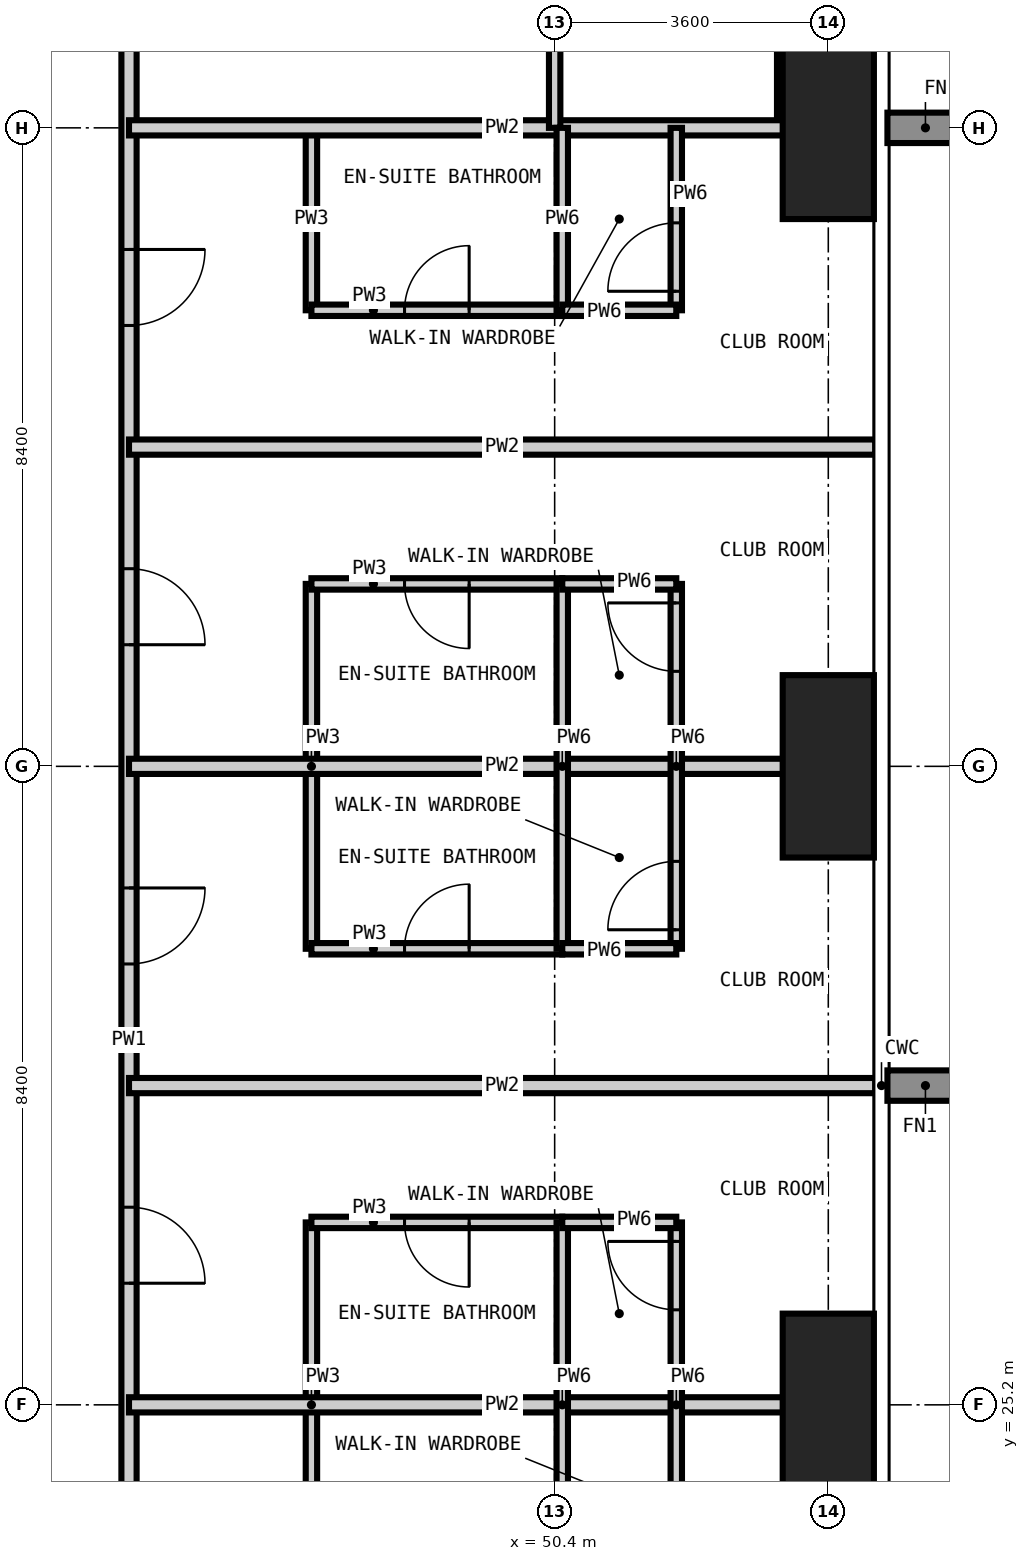
"""IFC4 building model, lengths in metres.
Left out: names, types, materials, properties, quantities, classifications, styles, units other than length and angle.
Written with IfcOpenShell. Run it as: python <this file> out.ifc"""

import sys

from ifc_helpers import new_model, si_unit, direction, frame, frame_2d, origin, origin_2d, place, context, subcontext, project, spatial, rectangle, extrude, element, fill, save


model = new_model("IFC4")
c1 = context("Model", 3, precision=1e-05, world=origin(), true_north=direction((0.0, 1.0)))
c2 = subcontext(c1, "Body", "Model", "MODEL_VIEW")
j1 = project(units=[si_unit("LENGTHUNIT", "METRE"), si_unit("PLANEANGLEUNIT", "RADIAN")], contexts=[c1])
p1 = place(None, origin())
s1 = spatial("IfcSite", under=j1, at=p1, CompositionType="ELEMENT")
p2 = place(p1, origin())
s2 = spatial("IfcBuilding", under=s1, at=p2, CompositionType="ELEMENT")
p3 = place(p2, frame((0.0, 0.0, 180.6)))
s3 = spatial("IfcBuildingStorey", under=s2, at=p3, CompositionType="ELEMENT", Elevation=180.6)
for number, where, z_axis, x_axis in (
    (1, (54.0, 25.2, -0.35), (0.0, 0.0, 1.0), (1.0, 0.0, 0.0)),
    (2, (54.0, 33.6, -0.35), (0.0, 0.0, 1.0), (1.0, 0.0, 0.0)),
    (3, (54.0, 42.0, -0.35), (0.0, 0.0, 1.0), (1.0, 0.0, 0.0)),
):
    element("IfcColumn", number, at=place(p3, frame(where, z_axis=z_axis, x_axis=x_axis)), inside=s3, PredefinedType="COLUMN", context=c2, shape_type="SweptSolid", body=[
        extrude(rectangle(XDim=1.2, YDim=2.4, at=origin_2d()), origin(), (0.0, 0.0, 1.0), 3.6),
    ])
for number, where, z_axis, x_axis in (
    (4, (47.2, 22.8, 0.0), (0.0, 0.0, 1.0), (0.0, 1.0, 0.0)),
    (5, (47.2, 31.2, 0.0), (0.0, 0.0, 1.0), (0.0, 1.0, 0.0)),
):
    element("IfcWall", number, at=place(p3, frame(where, z_axis=z_axis, x_axis=x_axis)), inside=s3, PredefinedType="PARTITIONING", context=c2, shape_type="SweptSolid", body=[
        extrude(rectangle(XDim=4.8, YDim=0.15, at=frame_2d((2.4, 0.0))), origin(), (0.0, 0.0, 1.0), 3.25),
    ])
p4 = place(p3, frame((47.2, 39.6, 0.0), z_axis=(0.0, 0.0, 1.0), x_axis=(0.0, 1.0, 0.0)))
e6 = element("IfcWall", 6, at=p4, inside=s3, PredefinedType="PARTITIONING", context=c2, shape_type="SweptSolid", body=[
    extrude(rectangle(XDim=2.4, YDim=0.15, at=frame_2d((1.2, 0.0))), origin(), (0.0, 0.0, 1.0), 3.25),
])
p5 = place(p3, frame((53.4, 42.0, 0.0), z_axis=(0.0, 0.0, 1.0), x_axis=(0.0, 1.0, 0.0)))
e7 = element("IfcWall", 7, at=p5, inside=s3, PredefinedType="PARTITIONING", context=c2, shape_type="SweptSolid", body=[
    extrude(rectangle(XDim=3.6, YDim=0.15, at=frame_2d((1.8, 0.0))), origin(), (0.0, 0.0, 1.0), 3.25),
])
p6 = place(p5, frame((1.375, 0.0, 0.0)))
e8 = element("IfcOpeningElement", 8, at=p6, cuts=e7, PredefinedType="OPENING", context=c2, shape_type="SweptSolid", body=[
    extrude(rectangle(XDim=0.85, YDim=2.1, at=frame_2d((0.425, 1.05))), frame((0.0, 0.085, 0.0), z_axis=(0.0, -1.0, 0.0), x_axis=(1.0, 0.0, 0.0)), (0.0, 0.0, 1.0), 0.17),
])
p7 = place(p3, frame((47.2, 27.6, 0.0), z_axis=(0.0, 0.0, 1.0), x_axis=(1.0, 0.0, 0.0)))
e9 = element("IfcWall", 9, at=p7, inside=s3, PredefinedType="PARTITIONING", context=c2, shape_type="SweptSolid", body=[
    extrude(rectangle(XDim=3.3, YDim=0.15, at=frame_2d((1.65, 0.0))), origin(), (0.0, 0.0, 1.0), 3.25),
])
p8 = place(p7, frame((1.225, 0.0, 0.0)))
e10 = element("IfcOpeningElement", 10, at=p8, cuts=e9, PredefinedType="OPENING", context=c2, shape_type="SweptSolid", body=[
    extrude(rectangle(XDim=0.85, YDim=2.1, at=frame_2d((0.425, 1.05))), frame((0.0, 0.085, 0.0), z_axis=(0.0, -1.0, 0.0), x_axis=(1.0, 0.0, 0.0)), (0.0, 0.0, 1.0), 0.17),
])
p9 = place(p3, frame((47.2, 31.2, 0.0), z_axis=(0.0, 0.0, 1.0), x_axis=(1.0, 0.0, 0.0)))
e11 = element("IfcWall", 11, at=p9, inside=s3, PredefinedType="PARTITIONING", context=c2, shape_type="SweptSolid", body=[
    extrude(rectangle(XDim=3.3, YDim=0.15, at=frame_2d((1.65, 0.0))), origin(), (0.0, 0.0, 1.0), 3.25),
])
p10 = place(p9, frame((1.225, 0.0, 0.0)))
e12 = element("IfcOpeningElement", 12, at=p10, cuts=e11, PredefinedType="OPENING", context=c2, shape_type="SweptSolid", body=[
    extrude(rectangle(XDim=0.85, YDim=2.1, at=frame_2d((0.425, 1.05))), frame((0.0, 0.085, 0.0), z_axis=(0.0, -1.0, 0.0), x_axis=(1.0, 0.0, 0.0)), (0.0, 0.0, 1.0), 0.17),
])
p11 = place(p3, frame((47.2, 36.0, 0.0), z_axis=(0.0, 0.0, 1.0), x_axis=(1.0, 0.0, 0.0)))
e13 = element("IfcWall", 13, at=p11, inside=s3, PredefinedType="PARTITIONING", context=c2, shape_type="SweptSolid", body=[
    extrude(rectangle(XDim=3.3, YDim=0.15, at=frame_2d((1.65, 0.0))), origin(), (0.0, 0.0, 1.0), 3.25),
])
p12 = place(p11, frame((1.225, 0.0, 0.0)))
e14 = element("IfcOpeningElement", 14, at=p12, cuts=e13, PredefinedType="OPENING", context=c2, shape_type="SweptSolid", body=[
    extrude(rectangle(XDim=0.85, YDim=2.1, at=frame_2d((0.425, 1.05))), frame((0.0, 0.085, 0.0), z_axis=(0.0, -1.0, 0.0), x_axis=(1.0, 0.0, 0.0)), (0.0, 0.0, 1.0), 0.17),
])
p13 = place(p3, frame((47.2, 39.6, 0.0), z_axis=(0.0, 0.0, 1.0), x_axis=(1.0, 0.0, 0.0)))
e15 = element("IfcWall", 15, at=p13, inside=s3, PredefinedType="PARTITIONING", context=c2, shape_type="SweptSolid", body=[
    extrude(rectangle(XDim=3.3, YDim=0.15, at=frame_2d((1.65, 0.0))), origin(), (0.0, 0.0, 1.0), 3.25),
])
p14 = place(p13, frame((1.225, 0.0, 0.0)))
e16 = element("IfcOpeningElement", 16, at=p14, cuts=e15, PredefinedType="OPENING", context=c2, shape_type="SweptSolid", body=[
    extrude(rectangle(XDim=0.85, YDim=2.1, at=frame_2d((0.425, 1.05))), frame((0.0, 0.085, 0.0), z_axis=(0.0, -1.0, 0.0), x_axis=(1.0, 0.0, 0.0)), (0.0, 0.0, 1.0), 0.17),
])
p15 = place(p3, frame((44.8, 45.4, 0.0), z_axis=(0.0, 0.0, 1.0), x_axis=(0.0, -1.0, 0.0)))
e17 = element("IfcWall", 17, at=p15, inside=s3, PredefinedType="PARTITIONING", context=c2, shape_type="SweptSolid", body=[
    extrude(rectangle(XDim=30.8, YDim=0.2, at=frame_2d((15.4, 0.0))), origin(), (0.0, 0.0, 1.0), 3.25),
])
p16 = place(p15, frame((26.0, 0.0, 0.0)))
e18 = element("IfcOpeningElement", 18, at=p16, cuts=e17, PredefinedType="OPENING", context=c2, shape_type="SweptSolid", body=[
    extrude(rectangle(XDim=1.0, YDim=2.2, at=frame_2d((0.5, 1.1))), frame((0.0, 0.11, 0.0), z_axis=(0.0, -1.0, 0.0), x_axis=(1.0, 0.0, 0.0)), (0.0, 0.0, 1.0), 0.22),
])
p17 = place(p15, frame((21.8, 0.0, 0.0)))
e19 = element("IfcOpeningElement", 19, at=p17, cuts=e17, PredefinedType="OPENING", context=c2, shape_type="SweptSolid", body=[
    extrude(rectangle(XDim=1.0, YDim=2.2, at=frame_2d((0.5, 1.1))), frame((0.0, 0.11, 0.0), z_axis=(0.0, -1.0, 0.0), x_axis=(1.0, 0.0, 0.0)), (0.0, 0.0, 1.0), 0.22),
])
p18 = place(p15, frame((17.6, 0.0, 0.0)))
e20 = element("IfcOpeningElement", 20, at=p18, cuts=e17, PredefinedType="OPENING", context=c2, shape_type="SweptSolid", body=[
    extrude(rectangle(XDim=1.0, YDim=2.2, at=frame_2d((0.5, 1.1))), frame((0.0, 0.11, 0.0), z_axis=(0.0, -1.0, 0.0), x_axis=(1.0, 0.0, 0.0)), (0.0, 0.0, 1.0), 0.22),
])
p19 = place(p15, frame((13.4, 0.0, 0.0)))
e21 = element("IfcOpeningElement", 21, at=p19, cuts=e17, PredefinedType="OPENING", context=c2, shape_type="SweptSolid", body=[
    extrude(rectangle(XDim=1.0, YDim=2.2, at=frame_2d((0.5, 1.1))), frame((0.0, 0.11, 0.0), z_axis=(0.0, -1.0, 0.0), x_axis=(1.0, 0.0, 0.0)), (0.0, 0.0, 1.0), 0.22),
])
p20 = place(p15, frame((9.2, 0.0, 0.0)))
e22 = element("IfcOpeningElement", 22, at=p20, cuts=e17, PredefinedType="OPENING", context=c2, shape_type="SweptSolid", body=[
    extrude(rectangle(XDim=1.0, YDim=2.2, at=frame_2d((0.5, 1.1))), frame((0.0, 0.11, 0.0), z_axis=(0.0, -1.0, 0.0), x_axis=(1.0, 0.0, 0.0)), (0.0, 0.0, 1.0), 0.22),
])
p21 = place(p15, frame((5.0, 0.0, 0.0)))
e23 = element("IfcOpeningElement", 23, at=p21, cuts=e17, PredefinedType="OPENING", context=c2, shape_type="SweptSolid", body=[
    extrude(rectangle(XDim=1.0, YDim=2.2, at=frame_2d((0.5, 1.1))), frame((0.0, 0.11, 0.0), z_axis=(0.0, -1.0, 0.0), x_axis=(1.0, 0.0, 0.0)), (0.0, 0.0, 1.0), 0.22),
])
p22 = place(p15, frame((29.2, 0.0, 0.0)))
e24 = element("IfcOpeningElement", 24, at=p22, cuts=e17, PredefinedType="OPENING", context=c2, shape_type="SweptSolid", body=[
    extrude(rectangle(XDim=1.0, YDim=2.2, at=frame_2d((0.5, 1.1))), frame((0.0, 0.11, 0.0), z_axis=(0.0, -1.0, 0.0), x_axis=(1.0, 0.0, 0.0)), (0.0, 0.0, 1.0), 0.22),
])
p23 = place(p15, frame((1.2, 0.0, 0.0)))
e25 = element("IfcOpeningElement", 25, at=p23, cuts=e17, PredefinedType="OPENING", context=c2, shape_type="SweptSolid", body=[
    extrude(rectangle(XDim=1.0, YDim=2.2, at=frame_2d((0.5, 1.1))), frame((0.0, 0.11, 0.0), z_axis=(0.0, -1.0, 0.0), x_axis=(1.0, 0.0, 0.0)), (0.0, 0.0, 1.0), 0.22),
])
for number, where, z_axis, x_axis in (
    (26, (44.8, 25.2, 0.0), (0.0, 0.0, 1.0), (1.0, 0.0, 0.0)),
    (27, (44.8, 29.4, 0.0), (0.0, 0.0, 1.0), (1.0, 0.0, 0.0)),
    (28, (44.8, 33.6, 0.0), (0.0, 0.0, 1.0), (1.0, 0.0, 0.0)),
    (29, (44.8, 37.8, 0.0), (0.0, 0.0, 1.0), (1.0, 0.0, 0.0)),
    (30, (44.8, 42.0, 0.0), (0.0, 0.0, 1.0), (1.0, 0.0, 0.0)),
):
    element("IfcWall", number, at=place(p3, frame(where, z_axis=z_axis, x_axis=x_axis)), inside=s3, PredefinedType="PARTITIONING", context=c2, shape_type="SweptSolid", body=[
        extrude(rectangle(XDim=9.818, YDim=0.2, at=frame_2d((4.909, 0.0))), origin(), (0.0, 0.0, 1.0), 3.25),
    ])
p24 = place(p3, frame((50.4, 42.0, 0.0), z_axis=(0.0, 0.0, 1.0), x_axis=(0.0, 1.0, 0.0)))
e31 = element("IfcWall", 31, at=p24, inside=s3, PredefinedType="PARTITIONING", context=c2, shape_type="SweptSolid", body=[
    extrude(rectangle(XDim=12.618, YDim=0.15, at=frame_2d((6.309, 0.0))), origin(), (0.0, 0.0, 1.0), 3.25),
])
p25 = place(p24, frame((8.85, 0.0, 0.0)))
e32 = element("IfcOpeningElement", 32, at=p25, cuts=e31, PredefinedType="OPENING", context=c2, shape_type="SweptSolid", body=[
    extrude(rectangle(XDim=0.9, YDim=2.1, at=frame_2d((0.45, 1.05))), frame((0.0, 0.085, 0.0), z_axis=(0.0, -1.0, 0.0), x_axis=(1.0, 0.0, 0.0)), (0.0, 0.0, 1.0), 0.17),
])
for number, where, z_axis, x_axis in (
    (33, (50.5, 22.8, 0.0), (0.0, 0.0, 1.0), (0.0, 1.0, 0.0)),
    (34, (50.5, 31.2, 0.0), (0.0, 0.0, 1.0), (0.0, 1.0, 0.0)),
):
    element("IfcWall", number, at=place(p3, frame(where, z_axis=z_axis, x_axis=x_axis)), inside=s3, PredefinedType="PARTITIONING", context=c2, shape_type="SweptSolid", body=[
        extrude(rectangle(XDim=4.8, YDim=0.15, at=frame_2d((2.4, 0.0))), origin(), (0.0, 0.0, 1.0), 3.25),
    ])
p26 = place(p3, frame((50.5, 39.6, 0.0), z_axis=(0.0, 0.0, 1.0), x_axis=(0.0, 1.0, 0.0)))
e35 = element("IfcWall", 35, at=p26, inside=s3, PredefinedType="PARTITIONING", context=c2, shape_type="SweptSolid", body=[
    extrude(rectangle(XDim=2.4, YDim=0.15, at=frame_2d((1.2, 0.0))), origin(), (0.0, 0.0, 1.0), 3.25),
])
p27 = place(p3, frame((52.0, 22.8, 0.0), z_axis=(0.0, 0.0, 1.0), x_axis=(0.0, 1.0, 0.0)))
e36 = element("IfcWall", 36, at=p27, inside=s3, PredefinedType="PARTITIONING", context=c2, shape_type="SweptSolid", body=[
    extrude(rectangle(XDim=4.8, YDim=0.15, at=frame_2d((2.4, 0.0))), origin(), (0.0, 0.0, 1.0), 3.25),
])
p28 = place(p27, frame((0.25, 0.0, 0.0)))
e37 = element("IfcOpeningElement", 37, at=p28, cuts=e36, PredefinedType="OPENING", context=c2, shape_type="SweptSolid", body=[
    extrude(rectangle(XDim=0.9, YDim=2.1, at=frame_2d((0.45, 1.05))), frame((0.0, 0.085, 0.0), z_axis=(0.0, -1.0, 0.0), x_axis=(1.0, 0.0, 0.0)), (0.0, 0.0, 1.0), 0.17),
])
p29 = place(p27, frame((3.65, 0.0, 0.0)))
e38 = element("IfcOpeningElement", 38, at=p29, cuts=e36, PredefinedType="OPENING", context=c2, shape_type="SweptSolid", body=[
    extrude(rectangle(XDim=0.9, YDim=2.1, at=frame_2d((0.45, 1.05))), frame((0.0, 0.085, 0.0), z_axis=(0.0, -1.0, 0.0), x_axis=(1.0, 0.0, 0.0)), (0.0, 0.0, 1.0), 0.17),
])
p30 = place(p3, frame((52.0, 31.2, 0.0), z_axis=(0.0, 0.0, 1.0), x_axis=(0.0, 1.0, 0.0)))
e39 = element("IfcWall", 39, at=p30, inside=s3, PredefinedType="PARTITIONING", context=c2, shape_type="SweptSolid", body=[
    extrude(rectangle(XDim=4.8, YDim=0.15, at=frame_2d((2.4, 0.0))), origin(), (0.0, 0.0, 1.0), 3.25),
])
p31 = place(p30, frame((0.25, 0.0, 0.0)))
e40 = element("IfcOpeningElement", 40, at=p31, cuts=e39, PredefinedType="OPENING", context=c2, shape_type="SweptSolid", body=[
    extrude(rectangle(XDim=0.9, YDim=2.1, at=frame_2d((0.45, 1.05))), frame((0.0, 0.085, 0.0), z_axis=(0.0, -1.0, 0.0), x_axis=(1.0, 0.0, 0.0)), (0.0, 0.0, 1.0), 0.17),
])
p32 = place(p30, frame((3.65, 0.0, 0.0)))
e41 = element("IfcOpeningElement", 41, at=p32, cuts=e39, PredefinedType="OPENING", context=c2, shape_type="SweptSolid", body=[
    extrude(rectangle(XDim=0.9, YDim=2.1, at=frame_2d((0.45, 1.05))), frame((0.0, 0.085, 0.0), z_axis=(0.0, -1.0, 0.0), x_axis=(1.0, 0.0, 0.0)), (0.0, 0.0, 1.0), 0.17),
])
p33 = place(p3, frame((52.0, 39.6, 0.0), z_axis=(0.0, 0.0, 1.0), x_axis=(0.0, 1.0, 0.0)))
e42 = element("IfcWall", 42, at=p33, inside=s3, PredefinedType="PARTITIONING", context=c2, shape_type="SweptSolid", body=[
    extrude(rectangle(XDim=2.4, YDim=0.15, at=frame_2d((1.2, 0.0))), origin(), (0.0, 0.0, 1.0), 3.25),
])
p34 = place(p33, frame((0.25, 0.0, 0.0)))
e43 = element("IfcOpeningElement", 43, at=p34, cuts=e42, PredefinedType="OPENING", context=c2, shape_type="SweptSolid", body=[
    extrude(rectangle(XDim=0.9, YDim=2.1, at=frame_2d((0.45, 1.05))), frame((0.0, 0.085, 0.0), z_axis=(0.0, -1.0, 0.0), x_axis=(1.0, 0.0, 0.0)), (0.0, 0.0, 1.0), 0.17),
])
for number, where, z_axis, x_axis in (
    (44, (50.5, 27.6, 0.0), (0.0, 0.0, 1.0), (1.0, 0.0, 0.0)),
    (45, (50.5, 31.2, 0.0), (0.0, 0.0, 1.0), (1.0, 0.0, 0.0)),
    (46, (50.5, 36.0, 0.0), (0.0, 0.0, 1.0), (1.0, 0.0, 0.0)),
    (47, (50.5, 39.6, 0.0), (0.0, 0.0, 1.0), (1.0, 0.0, 0.0)),
):
    element("IfcWall", number, at=place(p3, frame(where, z_axis=z_axis, x_axis=x_axis)), inside=s3, PredefinedType="PARTITIONING", context=c2, shape_type="SweptSolid", body=[
        extrude(rectangle(XDim=1.5, YDim=0.15, at=frame_2d((0.75, 0.0))), origin(), (0.0, 0.0, 1.0), 3.25),
    ])
p35 = place(p18, origin())
e48 = element("IfcDoor", 48, at=p35, inside=s3, OperationType="SINGLE_SWING_RIGHT", PredefinedType="DOOR", context=c2, shape_type="SweptSolid", body=[
    extrude(rectangle(XDim=1.0, YDim=2.2, at=frame_2d((0.5, 1.1))), frame((0.0, 0.025, 0.0), z_axis=(0.0, -1.0, 0.0), x_axis=(1.0, 0.0, 0.0)), (0.0, 0.0, 1.0), 0.05),
])
fill(e20, e48)
p36 = place(p8, frame((0.85, 0.0, 0.0), z_axis=(0.0, 0.0, 1.0), x_axis=(-1.0, 0.0, 0.0)))
e49 = element("IfcDoor", 49, at=p36, inside=s3, OperationType="SINGLE_SWING_LEFT", PredefinedType="DOOR", context=c2, shape_type="SweptSolid", body=[
    extrude(rectangle(XDim=0.85, YDim=2.1, at=frame_2d((0.425, 1.05))), frame((0.0, 0.025, 0.0), z_axis=(0.0, -1.0, 0.0), x_axis=(1.0, 0.0, 0.0)), (0.0, 0.0, 1.0), 0.05),
])
fill(e10, e49)
p37 = place(p29, origin())
e50 = element("IfcDoor", 50, at=p37, inside=s3, OperationType="SINGLE_SWING_RIGHT", PredefinedType="DOOR", context=c2, shape_type="SweptSolid", body=[
    extrude(rectangle(XDim=0.9, YDim=2.1, at=frame_2d((0.45, 1.05))), frame((0.0, 0.025, 0.0), z_axis=(0.0, -1.0, 0.0), x_axis=(1.0, 0.0, 0.0)), (0.0, 0.0, 1.0), 0.05),
])
fill(e38, e50)
p38 = place(p19, origin())
e51 = element("IfcDoor", 51, at=p38, inside=s3, OperationType="SINGLE_SWING_LEFT", PredefinedType="DOOR", context=c2, shape_type="SweptSolid", body=[
    extrude(rectangle(XDim=1.0, YDim=2.2, at=frame_2d((0.5, 1.1))), frame((0.0, 0.025, 0.0), z_axis=(0.0, -1.0, 0.0), x_axis=(1.0, 0.0, 0.0)), (0.0, 0.0, 1.0), 0.05),
])
fill(e21, e51)
p39 = place(p10, origin())
e52 = element("IfcDoor", 52, at=p39, inside=s3, OperationType="SINGLE_SWING_RIGHT", PredefinedType="DOOR", context=c2, shape_type="SweptSolid", body=[
    extrude(rectangle(XDim=0.85, YDim=2.1, at=frame_2d((0.425, 1.05))), frame((0.0, 0.025, 0.0), z_axis=(0.0, -1.0, 0.0), x_axis=(1.0, 0.0, 0.0)), (0.0, 0.0, 1.0), 0.05),
])
fill(e12, e52)
p40 = place(p31, origin())
e53 = element("IfcDoor", 53, at=p40, inside=s3, OperationType="SINGLE_SWING_LEFT", PredefinedType="DOOR", context=c2, shape_type="SweptSolid", body=[
    extrude(rectangle(XDim=0.9, YDim=2.1, at=frame_2d((0.45, 1.05))), frame((0.0, 0.025, 0.0), z_axis=(0.0, -1.0, 0.0), x_axis=(1.0, 0.0, 0.0)), (0.0, 0.0, 1.0), 0.05),
])
fill(e40, e53)
p41 = place(p20, origin())
e54 = element("IfcDoor", 54, at=p41, inside=s3, OperationType="SINGLE_SWING_RIGHT", PredefinedType="DOOR", context=c2, shape_type="SweptSolid", body=[
    extrude(rectangle(XDim=1.0, YDim=2.2, at=frame_2d((0.5, 1.1))), frame((0.0, 0.025, 0.0), z_axis=(0.0, -1.0, 0.0), x_axis=(1.0, 0.0, 0.0)), (0.0, 0.0, 1.0), 0.05),
])
fill(e22, e54)
p42 = place(p12, frame((0.85, 0.0, 0.0), z_axis=(0.0, 0.0, 1.0), x_axis=(-1.0, 0.0, 0.0)))
e55 = element("IfcDoor", 55, at=p42, inside=s3, OperationType="SINGLE_SWING_LEFT", PredefinedType="DOOR", context=c2, shape_type="SweptSolid", body=[
    extrude(rectangle(XDim=0.85, YDim=2.1, at=frame_2d((0.425, 1.05))), frame((0.0, 0.025, 0.0), z_axis=(0.0, -1.0, 0.0), x_axis=(1.0, 0.0, 0.0)), (0.0, 0.0, 1.0), 0.05),
])
fill(e14, e55)
p43 = place(p32, origin())
e56 = element("IfcDoor", 56, at=p43, inside=s3, OperationType="SINGLE_SWING_RIGHT", PredefinedType="DOOR", context=c2, shape_type="SweptSolid", body=[
    extrude(rectangle(XDim=0.9, YDim=2.1, at=frame_2d((0.45, 1.05))), frame((0.0, 0.025, 0.0), z_axis=(0.0, -1.0, 0.0), x_axis=(1.0, 0.0, 0.0)), (0.0, 0.0, 1.0), 0.05),
])
fill(e41, e56)
p44 = place(p21, origin())
e57 = element("IfcDoor", 57, at=p44, inside=s3, OperationType="SINGLE_SWING_LEFT", PredefinedType="DOOR", context=c2, shape_type="SweptSolid", body=[
    extrude(rectangle(XDim=1.0, YDim=2.2, at=frame_2d((0.5, 1.1))), frame((0.0, 0.025, 0.0), z_axis=(0.0, -1.0, 0.0), x_axis=(1.0, 0.0, 0.0)), (0.0, 0.0, 1.0), 0.05),
])
fill(e23, e57)
p45 = place(p14, origin())
e58 = element("IfcDoor", 58, at=p45, inside=s3, OperationType="SINGLE_SWING_RIGHT", PredefinedType="DOOR", context=c2, shape_type="SweptSolid", body=[
    extrude(rectangle(XDim=0.85, YDim=2.1, at=frame_2d((0.425, 1.05))), frame((0.0, 0.025, 0.0), z_axis=(0.0, -1.0, 0.0), x_axis=(1.0, 0.0, 0.0)), (0.0, 0.0, 1.0), 0.05),
])
fill(e16, e58)
p46 = place(p34, origin())
e59 = element("IfcDoor", 59, at=p46, inside=s3, OperationType="SINGLE_SWING_LEFT", PredefinedType="DOOR", context=c2, shape_type="SweptSolid", body=[
    extrude(rectangle(XDim=0.9, YDim=2.1, at=frame_2d((0.45, 1.05))), frame((0.0, 0.025, 0.0), z_axis=(0.0, -1.0, 0.0), x_axis=(1.0, 0.0, 0.0)), (0.0, 0.0, 1.0), 0.05),
])
fill(e43, e59)
save(model, sys.argv[1])
